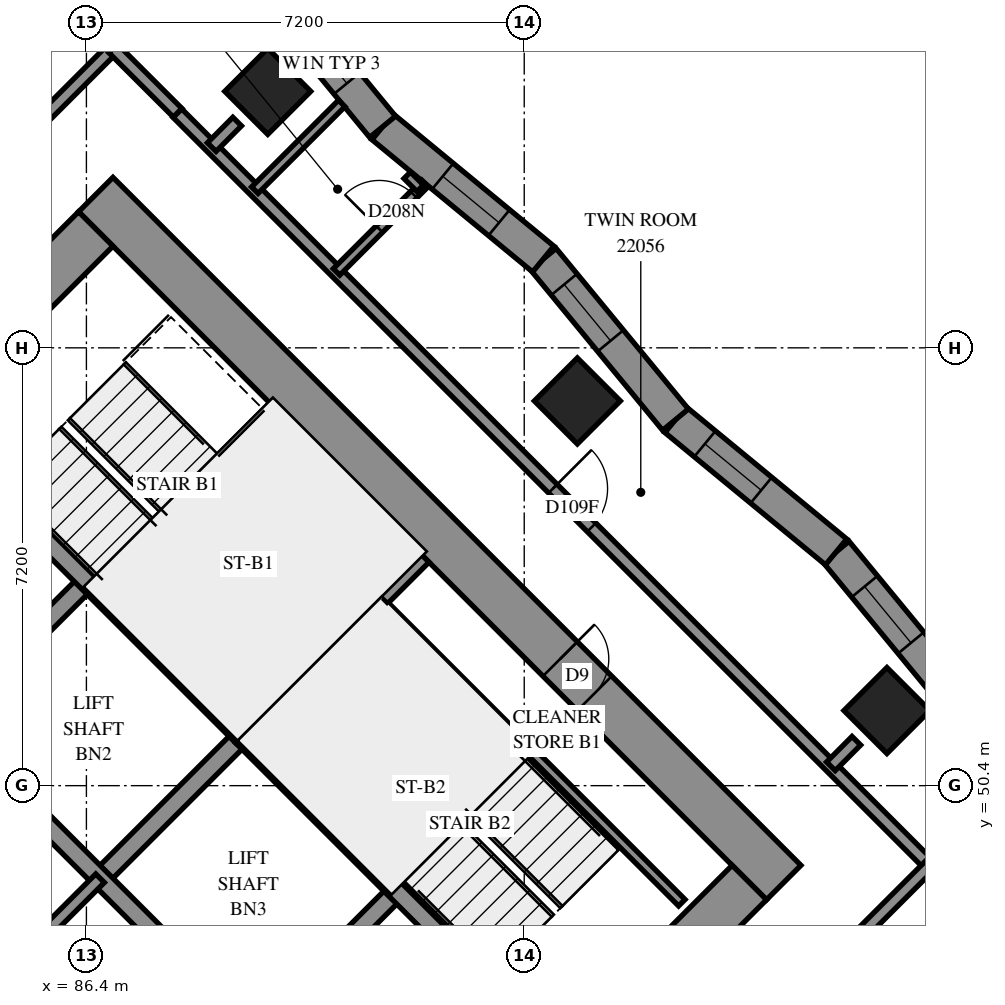
"""IFC4 building model, lengths in metres.
Left out: names, types, materials, properties, quantities, classifications, styles, units other than length and angle.
Written with IfcOpenShell. Run it as: python <this file> out.ifc"""

import sys

from ifc_helpers import new_model, si_unit, direction, frame, frame_2d, origin, origin_2d, place, context, subcontext, project, spatial, polyline, rectangle, outline, extrude, element, fill, save


model = new_model("IFC4")
c1 = context("Model", 3, precision=1e-05, world=origin(), true_north=direction((0.0, 1.0)))
c2 = subcontext(c1, "Body", "Model", "MODEL_VIEW")
j1 = project(units=[si_unit("LENGTHUNIT", "METRE"), si_unit("PLANEANGLEUNIT", "RADIAN")], contexts=[c1])
p1 = place(None, origin())
s1 = spatial("IfcSite", under=j1, at=p1, CompositionType="ELEMENT")
p2 = place(p1, origin())
s2 = spatial("IfcBuilding", under=s1, at=p2, CompositionType="ELEMENT")
p3 = place(p2, frame((0.0, 0.0, 84.6)))
s3 = spatial("IfcBuildingStorey", under=s2, at=p3, CompositionType="ELEMENT", Elevation=84.6)
for number, where, z_axis, x_axis in (
    (1, (89.382, 61.818, 0.0), (0.0, 0.0, 1.0), (0.707, -0.707, 0.0)),
    (2, (94.474, 56.727, 0.0), (0.0, 0.0, 1.0), (0.707, -0.707, 0.0)),
    (3, (99.565, 51.635, 0.0), (0.0, 0.0, 1.0), (0.707, -0.707, 0.0)),
):
    element("IfcColumn", number, at=place(p3, frame(where, z_axis=z_axis, x_axis=x_axis)), inside=s3, PredefinedType="COLUMN", context=c2, shape_type="SweptSolid", body=[
        extrude(rectangle(XDim=1.0, YDim=1.0, at=origin_2d()), origin(), (0.0, 0.0, 1.0), 3.1),
    ])
p4 = place(p3, frame((75.806, 49.373, -0.3), z_axis=(0.0, 0.0, 1.0), x_axis=(0.7071067812, -0.7071067812, 0.0)))
e4 = element("IfcWall", 4, at=p4, inside=s3, PredefinedType="SHEAR", context=c2, shape_type="SweptSolid", body=[
    extrude(rectangle(XDim=16.0, YDim=0.8, at=frame_2d((8.0, 0.0))), origin(), (0.0, 0.0, 1.0), 2.7),
])
p5 = place(p3, frame((86.554, 60.121, -0.3), z_axis=(0.0, 0.0, 1.0), x_axis=(0.7071067812, -0.7071067812, 0.0)))
e5 = element("IfcWall", 5, at=p5, inside=s3, PredefinedType="SHEAR", context=c2, shape_type="SweptSolid", body=[
    extrude(rectangle(XDim=16.0, YDim=0.8, at=frame_2d((8.0, 0.0))), origin(), (0.0, 0.0, 1.0), 2.7),
])
p6 = place(p5, frame((10.8, 0.0, 0.3)))
e6 = element("IfcOpeningElement", 6, at=p6, cuts=e5, PredefinedType="OPENING", context=c2, shape_type="SweptSolid", body=[
    extrude(rectangle(XDim=0.8, YDim=2.1, at=frame_2d((0.4, 1.05))), frame((0.0, 0.41, 0.0), z_axis=(0.0, -1.0, 0.0), x_axis=(1.0, 0.0, 0.0)), (0.0, 0.0, 1.0), 0.82),
])
p7 = place(p3, frame((76.372, 49.373, -0.3), z_axis=(0.0, 0.0, 1.0), x_axis=(0.7071067812, 0.7071067812, 0.0)))
e7 = element("IfcWall", 7, at=p7, inside=s3, PredefinedType="SHEAR", context=c2, shape_type="SweptSolid", body=[
    extrude(rectangle(XDim=14.4, YDim=0.8, at=frame_2d((7.2, 0.0))), origin(), (0.0, 0.0, 1.0), 2.7),
])
p8 = place(p7, frame((4.55, 0.0, 0.3)))
e8 = element("IfcOpeningElement", 8, at=p8, cuts=e7, PredefinedType="OPENING", context=c2, shape_type="SweptSolid", body=[
    extrude(rectangle(XDim=1.1, YDim=2.1, at=frame_2d((0.55, 1.05))), frame((0.0, 0.41, 0.0), z_axis=(0.0, -1.0, 0.0), x_axis=(1.0, 0.0, 0.0)), (0.0, 0.0, 1.0), 0.82),
])
p9 = place(p7, frame((11.35, 0.0, 0.3)))
e9 = element("IfcOpeningElement", 9, at=p9, cuts=e7, PredefinedType="OPENING", context=c2, shape_type="SweptSolid", body=[
    extrude(rectangle(XDim=1.1, YDim=2.1, at=frame_2d((0.55, 1.05))), frame((0.0, 0.41, 0.0), z_axis=(0.0, -1.0, 0.0), x_axis=(1.0, 0.0, 0.0)), (0.0, 0.0, 1.0), 0.82),
])
p10 = place(p3, frame((87.12, 38.625, -0.3), z_axis=(0.0, 0.0, 1.0), x_axis=(0.7071067812, 0.7071067812, 0.0)))
e10 = element("IfcWall", 10, at=p10, inside=s3, PredefinedType="SHEAR", context=c2, shape_type="SweptSolid", body=[
    extrude(rectangle(XDim=14.4, YDim=0.8, at=frame_2d((7.2, 0.0))), origin(), (0.0, 0.0, 1.0), 2.7),
])
p11 = place(p10, frame((4.55, 0.0, 0.3)))
e11 = element("IfcOpeningElement", 11, at=p11, cuts=e10, PredefinedType="OPENING", context=c2, shape_type="SweptSolid", body=[
    extrude(rectangle(XDim=1.1, YDim=2.1, at=frame_2d((0.55, 1.05))), frame((0.0, 0.41, 0.0), z_axis=(0.0, -1.0, 0.0), x_axis=(1.0, 0.0, 0.0)), (0.0, 0.0, 1.0), 0.82),
])
p12 = place(p10, frame((11.35, 0.0, 0.3)))
e12 = element("IfcOpeningElement", 12, at=p12, cuts=e10, PredefinedType="OPENING", context=c2, shape_type="SweptSolid", body=[
    extrude(rectangle(XDim=1.1, YDim=2.1, at=frame_2d((0.55, 1.05))), frame((0.0, 0.41, 0.0), z_axis=(0.0, -1.0, 0.0), x_axis=(1.0, 0.0, 0.0)), (0.0, 0.0, 1.0), 0.82),
])
p13 = place(p3, frame((84.079, 51.423, 0.0), z_axis=(0.0, 0.0, 1.0), x_axis=(0.7071219326, 0.7070916295, 0.0)))
e13 = element("IfcWall", 13, at=p13, inside=s3, PredefinedType="SOLIDWALL", context=c2, shape_type="SweptSolid", body=[
    extrude(rectangle(XDim=3.3, YDim=0.3, at=frame_2d((1.65, 0.0))), origin(), (0.0, 0.0, 1.0), 3.1),
])
for number, where, z_axis, x_axis in (
    (14, (86.625, 48.878, 0.0), (0.0, 0.0, 1.0), (0.707, 0.707, 0.0)),
    (15, (89.17, 46.332, 0.0), (0.0, 0.0, 1.0), (0.707, 0.707, 0.0)),
):
    element("IfcWall", number, at=place(p3, frame(where, z_axis=z_axis, x_axis=x_axis)), inside=s3, PredefinedType="SOLIDWALL", context=c2, shape_type="SweptSolid", body=[
        extrude(rectangle(XDim=3.3, YDim=0.3, at=frame_2d((1.65, 0.0))), origin(), (0.0, 0.0, 1.0), 3.1),
    ])
p14 = place(p3, frame((78.988, 51.423, 0.0), z_axis=(0.0, 0.0, 1.0), x_axis=(0.7071067812, -0.7071067812, 0.0)))
e16 = element("IfcWall", 16, at=p14, inside=s3, PredefinedType="SOLIDWALL", context=c2, shape_type="SweptSolid", body=[
    extrude(rectangle(XDim=14.4, YDim=0.3, at=frame_2d((7.2, 0.0))), origin(), (0.0, 0.0, 1.0), 3.1),
])
p15 = place(p14, frame((1.25, 0.0, 0.0)))
e17 = element("IfcOpeningElement", 17, at=p15, cuts=e16, PredefinedType="OPENING", context=c2, shape_type="SweptSolid", body=[
    extrude(rectangle(XDim=1.1, YDim=2.1, at=frame_2d((0.55, 1.05))), frame((0.0, 0.16, 0.0), z_axis=(0.0, -1.0, 0.0), x_axis=(1.0, 0.0, 0.0)), (0.0, 0.0, 1.0), 0.32),
])
p16 = place(p14, frame((4.85, 0.0, 0.0)))
e18 = element("IfcOpeningElement", 18, at=p16, cuts=e16, PredefinedType="OPENING", context=c2, shape_type="SweptSolid", body=[
    extrude(rectangle(XDim=1.1, YDim=2.1, at=frame_2d((0.55, 1.05))), frame((0.0, 0.16, 0.0), z_axis=(0.0, -1.0, 0.0), x_axis=(1.0, 0.0, 0.0)), (0.0, 0.0, 1.0), 0.32),
])
p17 = place(p14, frame((8.45, 0.0, 0.0)))
e19 = element("IfcOpeningElement", 19, at=p17, cuts=e16, PredefinedType="OPENING", context=c2, shape_type="SweptSolid", body=[
    extrude(rectangle(XDim=1.1, YDim=2.1, at=frame_2d((0.55, 1.05))), frame((0.0, 0.16, 0.0), z_axis=(0.0, -1.0, 0.0), x_axis=(1.0, 0.0, 0.0)), (0.0, 0.0, 1.0), 0.32),
])
p18 = place(p14, frame((12.05, 0.0, 0.0)))
e20 = element("IfcOpeningElement", 20, at=p18, cuts=e16, PredefinedType="OPENING", context=c2, shape_type="SweptSolid", body=[
    extrude(rectangle(XDim=1.1, YDim=2.1, at=frame_2d((0.55, 1.05))), frame((0.0, 0.16, 0.0), z_axis=(0.0, -1.0, 0.0), x_axis=(1.0, 0.0, 0.0)), (0.0, 0.0, 1.0), 0.32),
])
p19 = place(p3, frame((81.534, 53.969, 0.0), z_axis=(0.0, 0.0, 1.0), x_axis=(0.707103309, -0.7071102534, 0.0)))
e21 = element("IfcWall", 21, at=p19, inside=s3, PredefinedType="SOLIDWALL", context=c2, shape_type="SweptSolid", body=[
    extrude(rectangle(XDim=14.4, YDim=0.3, at=frame_2d((7.2, 0.0))), origin(), (0.0, 0.0, 1.0), 3.1),
])
p20 = place(p19, frame((12.05, 0.0, 0.0)))
e22 = element("IfcOpeningElement", 22, at=p20, cuts=e21, PredefinedType="OPENING", context=c2, shape_type="SweptSolid", body=[
    extrude(rectangle(XDim=1.1, YDim=2.1, at=frame_2d((0.55, 1.05))), frame((0.0, 0.16, 0.0), z_axis=(0.0, -1.0, 0.0), x_axis=(1.0, 0.0, 0.0)), (0.0, 0.0, 1.0), 0.32),
])
for number, where, z_axis, x_axis in (
    (23, (83.867, 56.302, 0.0), (0.0, 0.0, 1.0), (0.707, -0.707, 0.0)),
    (24, (88.958, 51.211, 0.0), (0.0, 0.0, 1.0), (0.707, -0.707, 0.0)),
):
    element("IfcWall", number, at=place(p3, frame(where, z_axis=z_axis, x_axis=x_axis)), inside=s3, PredefinedType="SOLIDWALL", context=c2, shape_type="SweptSolid", body=[
        extrude(rectangle(XDim=7.2, YDim=0.3, at=frame_2d((3.6, 0.0))), origin(), (0.0, 0.0, 1.0), 3.1),
    ])
p21 = place(p3, frame((88.958, 51.211, 0.0), z_axis=(0.0, 0.0, 1.0), x_axis=(0.7071067812, 0.7071067812, 0.0)))
e25 = element("IfcWall", 25, at=p21, inside=s3, PredefinedType="SOLIDWALL", context=c2, shape_type="SweptSolid", body=[
    extrude(rectangle(XDim=4.2, YDim=0.3, at=frame_2d((2.1, 0.0))), origin(), (0.0, 0.0, 1.0), 3.1),
])
p22 = place(p3, frame((100.904, 51.602, 0.0), z_axis=(0.0, 0.0, 1.0), x_axis=(-0.6356171067, 0.7720044648, 0.0)))
e26 = element("IfcWall", 26, at=p22, inside=s3, PredefinedType="SOLIDWALL", context=c2, shape_type="SweptSolid", body=[
    extrude(outline(polyline([(0.027, -0.275), (3.449, -0.275), (3.395, 0.275), (-0.027, 0.275), (0.027, -0.275)])), origin(), (0.0, 0.0, 1.0), 3.1),
])
p23 = place(p22, frame((1.485, 0.0, 0.5)))
e27 = element("IfcOpeningElement", 27, at=p23, cuts=e26, PredefinedType="OPENING", context=c2, shape_type="SweptSolid", body=[
    extrude(rectangle(XDim=1.2, YDim=2.45, at=frame_2d((0.6, 1.225))), frame((0.0, 0.285, 0.0), z_axis=(0.0, -1.0, 0.0), x_axis=(1.0, 0.0, 0.0)), (0.0, 0.0, 1.0), 0.57),
])
p24 = place(p3, frame((98.729, 54.244, 0.0), z_axis=(0.0, 0.0, 1.0), x_axis=(-0.7720044648, 0.6356171067, 0.0)))
e28 = element("IfcWall", 28, at=p24, inside=s3, PredefinedType="SOLIDWALL", context=c2, shape_type="SweptSolid", body=[
    extrude(outline(polyline([(-0.027, -0.275), (3.395, -0.275), (3.449, 0.275), (0.027, 0.275), (-0.027, -0.275)])), origin(), (0.0, 0.0, 1.0), 3.1),
])
p25 = place(p24, frame((1.596, 0.0, 0.5)))
e29 = element("IfcOpeningElement", 29, at=p25, cuts=e28, PredefinedType="OPENING", context=c2, shape_type="SweptSolid", body=[
    extrude(rectangle(XDim=1.2, YDim=2.45, at=frame_2d((0.6, 1.225))), frame((0.0, 0.285, 0.0), z_axis=(0.0, -1.0, 0.0), x_axis=(1.0, 0.0, 0.0)), (0.0, 0.0, 1.0), 0.57),
])
p26 = place(p3, frame((96.088, 56.419, 0.0), z_axis=(0.0, 0.0, 1.0), x_axis=(-0.6356140296, 0.7720069983, 0.0)))
e30 = element("IfcWall", 30, at=p26, inside=s3, PredefinedType="SOLIDWALL", context=c2, shape_type="SweptSolid", body=[
    extrude(outline(polyline([(0.027, -0.275), (3.449, -0.275), (3.395, 0.275), (-0.027, 0.275), (0.027, -0.275)])), origin(), (0.0, 0.0, 1.0), 3.1),
])
p27 = place(p26, frame((1.68, 0.0, 0.5)))
e31 = element("IfcOpeningElement", 31, at=p27, cuts=e30, PredefinedType="OPENING", context=c2, shape_type="SweptSolid", body=[
    extrude(rectangle(XDim=1.2, YDim=2.45, at=frame_2d((0.6, 1.225))), frame((0.0, 0.285, 0.0), z_axis=(0.0, -1.0, 0.0), x_axis=(1.0, 0.0, 0.0)), (0.0, 0.0, 1.0), 0.57),
])
p28 = place(p3, frame((93.913, 59.06, 0.0), z_axis=(0.0, 0.0, 1.0), x_axis=(-0.7720044648, 0.6356171067, 0.0)))
e32 = element("IfcWall", 32, at=p28, inside=s3, PredefinedType="SOLIDWALL", context=c2, shape_type="SweptSolid", body=[
    extrude(outline(polyline([(-0.027, -0.275), (3.395, -0.275), (3.449, 0.275), (0.027, 0.275), (-0.027, -0.275)])), origin(), (0.0, 0.0, 1.0), 3.1),
])
p29 = place(p28, frame((0.941, 0.0, 0.5)))
e33 = element("IfcOpeningElement", 33, at=p29, cuts=e32, PredefinedType="OPENING", context=c2, shape_type="SweptSolid", body=[
    extrude(rectangle(XDim=1.2, YDim=2.45, at=frame_2d((0.6, 1.225))), frame((0.0, 0.285, 0.0), z_axis=(0.0, -1.0, 0.0), x_axis=(1.0, 0.0, 0.0)), (0.0, 0.0, 1.0), 0.57),
])
p30 = place(p3, frame((91.271, 61.235, 0.0), z_axis=(0.0, 0.0, 1.0), x_axis=(-0.6356171067, 0.7720044648, 0.0)))
e34 = element("IfcWall", 34, at=p30, inside=s3, PredefinedType="SOLIDWALL", context=c2, shape_type="SweptSolid", body=[
    extrude(outline(polyline([(0.027, -0.275), (3.449, -0.275), (3.395, 0.275), (-0.027, 0.275), (0.027, -0.275)])), origin(), (0.0, 0.0, 1.0), 3.1),
])
p31 = place(p30, frame((1.875, 0.0, 0.5)))
e35 = element("IfcOpeningElement", 35, at=p31, cuts=e34, PredefinedType="OPENING", context=c2, shape_type="SweptSolid", body=[
    extrude(rectangle(XDim=1.2, YDim=2.45, at=frame_2d((0.6, 1.225))), frame((0.0, 0.285, 0.0), z_axis=(0.0, -1.0, 0.0), x_axis=(1.0, 0.0, 0.0)), (0.0, 0.0, 1.0), 0.57),
])
p32 = place(p30, frame((0.925, 0.0, 0.45)))
e36 = element("IfcOpeningElement", 36, at=p32, cuts=e34, PredefinedType="OPENING", context=c2, shape_type="SweptSolid", body=[
    extrude(rectangle(XDim=0.8, YDim=2.5, at=frame_2d((0.4, 1.25))), frame((0.0, 0.285, 0.0), z_axis=(0.0, -1.0, 0.0), x_axis=(1.0, 0.0, 0.0)), (0.0, 0.0, 1.0), 0.57),
])
p33 = place(p3, frame((91.313, 53.354, 0.0), z_axis=(0.0, 0.0, 1.0), x_axis=(0.7071140275, -0.7070995348, 0.0)))
e37 = element("IfcWall", 37, at=p33, inside=s3, PredefinedType="PARTITIONING", context=c2, shape_type="SweptSolid", body=[
    extrude(rectangle(XDim=6.9, YDim=0.15, at=frame_2d((3.45, 0.0))), origin(), (0.0, 0.0, 1.0), 3.1),
])
p34 = place(p3, frame((84.079, 46.332, 0.0), z_axis=(0.0, 0.0, 1.0), x_axis=(0.7071067812, 0.7071067812, 0.0)))
e38 = element("IfcWall", 38, at=p34, inside=s3, PredefinedType="PARTITIONING", context=c2, shape_type="SweptSolid", body=[
    extrude(rectangle(XDim=3.6, YDim=0.2, at=frame_2d((1.8, 0.0))), origin(), (0.0, 0.0, 1.0), 3.1),
])
p35 = place(p3, frame((87.894, 61.461, 0.0), z_axis=(0.0, 0.0, 1.0), x_axis=(0.7071067812, -0.7071067812, 0.0)))
e39 = element("IfcWall", 39, at=p35, inside=s3, PredefinedType="PARTITIONING", context=c2, shape_type="SweptSolid", body=[
    extrude(rectangle(XDim=17.5, YDim=0.2, at=frame_2d((8.75, 0.0))), origin(), (0.0, 0.0, 1.0), 3.1),
])
p36 = place(p35, frame((8.735, 0.0, 0.0)))
e40 = element("IfcOpeningElement", 40, at=p36, cuts=e39, PredefinedType="OPENING", context=c2, shape_type="SweptSolid", body=[
    extrude(rectangle(XDim=0.9, YDim=2.1, at=frame_2d((0.45, 1.05))), frame((0.0, 0.11, 0.0), z_axis=(0.0, -1.0, 0.0), x_axis=(1.0, 0.0, 0.0)), (0.0, 0.0, 1.0), 0.22),
])
p37 = place(p3, frame((95.215, 42.197, 0.0), z_axis=(0.0, 0.0, 1.0), x_axis=(0.7071114753, 0.7071020871, 0.0)))
e41 = element("IfcWall", 41, at=p37, inside=s3, PredefinedType="PARTITIONING", context=c2, shape_type="SweptSolid", body=[
    extrude(rectangle(XDim=10.652, YDim=0.2, at=frame_2d((5.326, 0.0))), origin(), (0.0, 0.0, 1.0), 3.1),
])
p38 = place(p3, frame((80.949, 58.477, 0.0), z_axis=(0.0, 0.0, 1.0), x_axis=(0.7071122668, 0.7071012955, 0.0)))
e42 = element("IfcWall", 42, at=p38, inside=s3, PredefinedType="PARTITIONING", context=c2, shape_type="SweptSolid", body=[
    extrude(rectangle(XDim=9.115, YDim=0.2, at=frame_2d((4.557, 0.0))), origin(), (0.0, 0.0, 1.0), 3.1),
])
p39 = place(p3, frame((94.297, 43.117, 0.0), z_axis=(0.0, 0.0, 1.0), x_axis=(0.7071067812, 0.7071067812, 0.0)))
e43 = element("IfcWall", 43, at=p39, inside=s3, PredefinedType="PARTITIONING", context=c2, shape_type="SweptSolid", body=[
    extrude(rectangle(XDim=8.448, YDim=0.2, at=frame_2d((4.224, 0.0))), origin(), (0.0, 0.0, 1.0), 3.1),
])
p40 = place(p39, frame((0.242, 0.0, 0.0)))
e44 = element("IfcOpeningElement", 44, at=p40, cuts=e43, PredefinedType="OPENING", context=c2, shape_type="SweptSolid", body=[
    extrude(rectangle(XDim=1.0, YDim=2.1, at=frame_2d((0.5, 1.05))), frame((0.0, 0.11, 0.0), z_axis=(0.0, -1.0, 0.0), x_axis=(1.0, 0.0, 0.0)), (0.0, 0.0, 1.0), 0.22),
])
p41 = place(p3, frame((80.951, 56.641, 0.0), z_axis=(0.0, 0.0, 1.0), x_axis=(0.7071067812, 0.7071067812, 0.0)))
e45 = element("IfcWall", 45, at=p41, inside=s3, PredefinedType="PARTITIONING", context=c2, shape_type="SweptSolid", body=[
    extrude(rectangle(XDim=8.321, YDim=0.2, at=frame_2d((4.161, 0.0))), origin(), (0.0, 0.0, 1.0), 3.1),
])
p42 = place(p41, frame((0.816, 0.0, 0.0)))
e46 = element("IfcOpeningElement", 46, at=p42, cuts=e45, PredefinedType="OPENING", context=c2, shape_type="SweptSolid", body=[
    extrude(rectangle(XDim=1.0, YDim=2.1, at=frame_2d((0.5, 1.05))), frame((0.0, 0.11, 0.0), z_axis=(0.0, -1.0, 0.0), x_axis=(1.0, 0.0, 0.0)), (0.0, 0.0, 1.0), 0.22),
])
p43 = place(p3, frame((90.513, 58.849, 0.0), z_axis=(0.0, 0.0, 1.0), x_axis=(0.7071067812, 0.7071067812, 0.0)))
e47 = element("IfcWall", 47, at=p43, inside=s3, PredefinedType="PARTITIONING", context=c2, shape_type="SweptSolid", body=[
    extrude(rectangle(XDim=2.059, YDim=0.15, at=frame_2d((1.029, 0.0))), origin(), (0.0, 0.0, 1.0), 3.1),
])
p44 = place(p43, frame((0.996, 0.0, 0.0)))
e48 = element("IfcOpeningElement", 48, at=p44, cuts=e47, PredefinedType="OPENING", context=c2, shape_type="SweptSolid", body=[
    extrude(rectangle(XDim=0.8, YDim=2.1, at=frame_2d((0.4, 1.05))), frame((0.0, 0.085, 0.0), z_axis=(0.0, -1.0, 0.0), x_axis=(1.0, 0.0, 0.0)), (0.0, 0.0, 1.0), 0.17),
])
p45 = place(p3, frame((89.169, 60.193, 0.0), z_axis=(0.0, 0.0, 1.0), x_axis=(0.7076512613, 0.7065618815, 0.0)))
e49 = element("IfcWall", 49, at=p45, inside=s3, PredefinedType="PARTITIONING", context=c2, shape_type="SweptSolid", body=[
    extrude(rectangle(XDim=2.019, YDim=0.15, at=frame_2d((1.01, 0.0))), origin(), (0.0, 0.0, 1.0), 3.1),
])
p46 = place(p3, frame((86.838, 62.526, 0.0), z_axis=(0.0, 0.0, 1.0), x_axis=(0.70777292, -0.7064400143, 0.0)))
e50 = element("IfcWall", 50, at=p46, inside=s3, PredefinedType="PARTITIONING", context=c2, shape_type="SweptSolid", body=[
    extrude(rectangle(XDim=1.5, YDim=0.2, at=frame_2d((0.75, 0.0))), origin(), (0.0, 0.0, 1.0), 3.1),
])
for number, where, z_axis, x_axis in (
    (51, (88.461, 60.901, 0.0), (0.0, 0.0, 1.0), (0.705, 0.709, 0.0)),
    (52, (98.644, 50.718, 0.0), (0.0, 0.0, 1.0), (0.705, 0.709, 0.0)),
):
    element("IfcWall", number, at=place(p3, frame(where, z_axis=z_axis, x_axis=x_axis)), inside=s3, PredefinedType="PARTITIONING", context=c2, shape_type="SweptSolid", body=[
        extrude(rectangle(XDim=0.593, YDim=0.2, at=frame_2d((0.296, 0.0))), origin(), (0.0, 0.0, 1.0), 3.1),
    ])
p47 = place(p3, frame((91.675, 60.437, 0.0), z_axis=(0.0, 0.0, 1.0), x_axis=(0.7071067812, -0.7071067812, 0.0)))
e53 = element("IfcWall", 53, at=p47, inside=s3, PredefinedType="PARTITIONING", context=c2, shape_type="SweptSolid", body=[
    extrude(rectangle(XDim=0.303, YDim=0.15, at=frame_2d((0.151, 0.0))), origin(), (0.0, 0.0, 1.0), 3.1),
])
p48 = place(p23, origin())
e54 = element("IfcWindow", 54, at=p48, inside=s3, PartitioningType="SINGLE_PANEL", PredefinedType="WINDOW", context=c2, shape_type="SweptSolid", body=[
    extrude(rectangle(XDim=1.2, YDim=2.45, at=frame_2d((0.6, 1.225))), frame((0.0, 0.155, 0.0), z_axis=(0.0, -1.0, 0.0), x_axis=(1.0, 0.0, 0.0)), (0.0, 0.0, 1.0), 0.06),
])
fill(e27, e54)
p49 = place(p25, origin())
e55 = element("IfcWindow", 55, at=p49, inside=s3, PartitioningType="SINGLE_PANEL", PredefinedType="WINDOW", context=c2, shape_type="SweptSolid", body=[
    extrude(rectangle(XDim=1.2, YDim=2.45, at=frame_2d((0.6, 1.225))), frame((0.0, 0.155, 0.0), z_axis=(0.0, -1.0, 0.0), x_axis=(1.0, 0.0, 0.0)), (0.0, 0.0, 1.0), 0.06),
])
fill(e29, e55)
p50 = place(p27, origin())
e56 = element("IfcWindow", 56, at=p50, inside=s3, PartitioningType="SINGLE_PANEL", PredefinedType="WINDOW", context=c2, shape_type="SweptSolid", body=[
    extrude(rectangle(XDim=1.2, YDim=2.45, at=frame_2d((0.6, 1.225))), frame((0.0, 0.155, 0.0), z_axis=(0.0, -1.0, 0.0), x_axis=(1.0, 0.0, 0.0)), (0.0, 0.0, 1.0), 0.06),
])
fill(e31, e56)
p51 = place(p29, origin())
e57 = element("IfcWindow", 57, at=p51, inside=s3, PartitioningType="SINGLE_PANEL", PredefinedType="WINDOW", context=c2, shape_type="SweptSolid", body=[
    extrude(rectangle(XDim=1.2, YDim=2.45, at=frame_2d((0.6, 1.225))), frame((0.0, 0.155, 0.0), z_axis=(0.0, -1.0, 0.0), x_axis=(1.0, 0.0, 0.0)), (0.0, 0.0, 1.0), 0.06),
])
fill(e33, e57)
p52 = place(p6, origin())
e58 = element("IfcDoor", 58, at=p52, inside=s3, OperationType="SINGLE_SWING_RIGHT", PredefinedType="DOOR", context=c2, shape_type="SweptSolid", body=[
    extrude(rectangle(XDim=0.8, YDim=2.1, at=frame_2d((0.4, 1.05))), frame((0.0, -0.34, 0.0), z_axis=(0.0, -1.0, 0.0), x_axis=(1.0, 0.0, 0.0)), (0.0, 0.0, 1.0), 0.05),
])
fill(e6, e58)
p53 = place(p36, origin())
e59 = element("IfcDoor", 59, at=p53, inside=s3, OperationType="SINGLE_SWING_LEFT", PredefinedType="DOOR", context=c2, shape_type="SweptSolid", body=[
    extrude(rectangle(XDim=0.9, YDim=2.1, at=frame_2d((0.45, 1.05))), frame((0.0, 0.025, 0.0), z_axis=(0.0, -1.0, 0.0), x_axis=(1.0, 0.0, 0.0)), (0.0, 0.0, 1.0), 0.05),
])
fill(e40, e59)
p54 = place(p44, origin())
e60 = element("IfcDoor", 60, at=p54, inside=s3, OperationType="SINGLE_SWING_RIGHT", PredefinedType="DOOR", context=c2, shape_type="SweptSolid", body=[
    extrude(rectangle(XDim=0.8, YDim=2.1, at=frame_2d((0.4, 1.05))), frame((0.0, 0.025, 0.0), z_axis=(0.0, -1.0, 0.0), x_axis=(1.0, 0.0, 0.0)), (0.0, 0.0, 1.0), 0.05),
])
fill(e48, e60)
p55 = place(p32, origin())
e61 = element("IfcWindow", 61, at=p55, inside=s3, PartitioningType="SINGLE_PANEL", PredefinedType="WINDOW", context=c2, shape_type="SweptSolid", body=[
    extrude(rectangle(XDim=0.8, YDim=2.5, at=frame_2d((0.4, 1.25))), frame((0.0, 0.155, 0.0), z_axis=(0.0, -1.0, 0.0), x_axis=(1.0, 0.0, 0.0)), (0.0, 0.0, 1.0), 0.06),
])
fill(e36, e61)
save(model, sys.argv[1])
